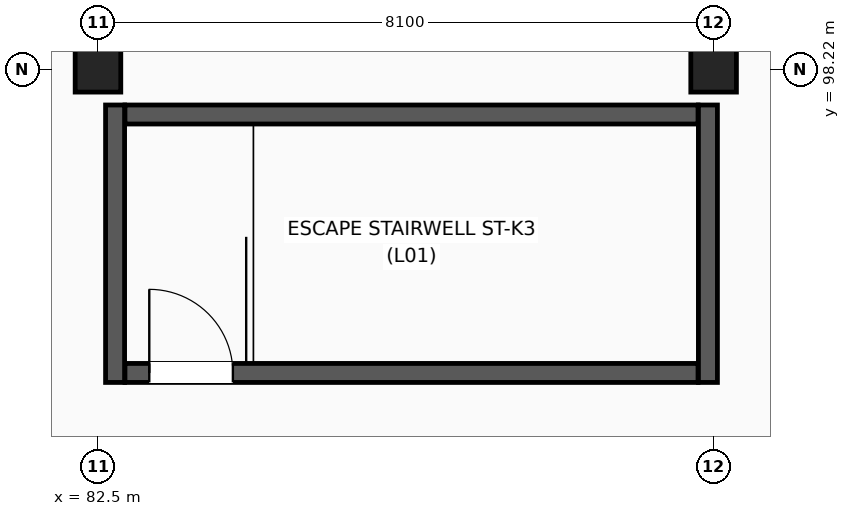
"""IFC4 building model, lengths in metres.
Left out: names, types, materials, properties, quantities, classifications, styles, units other than length and angle.
Written with IfcOpenShell. Run it as: python <this file> out.ifc"""

import sys

from ifc_helpers import new_model, si_unit, direction, frame, frame_2d, origin, origin_2d, place, context, subcontext, project, spatial, rectangle, extrude, element, fill, save


model = new_model("IFC4")
c1 = context("Model", 3, precision=1e-05, world=origin(), true_north=direction((0.0, 1.0)))
c2 = subcontext(c1, "Body", "Model", "MODEL_VIEW")
j1 = project(units=[si_unit("LENGTHUNIT", "METRE"), si_unit("PLANEANGLEUNIT", "RADIAN")], contexts=[c1])
p1 = place(None, origin())
s1 = spatial("IfcSite", under=j1, at=p1, CompositionType="ELEMENT")
p2 = place(p1, origin())
s2 = spatial("IfcBuilding", under=s1, at=p2, CompositionType="ELEMENT")
p3 = place(p2, frame((0.0, 0.0, 5.4)))
s3 = spatial("IfcBuildingStorey", under=s2, at=p3, CompositionType="ELEMENT", Elevation=5.4)
for number, where, z_axis, x_axis in (
    (1, (82.5, 98.22, 0.0), (0.0, 0.0, 1.0), (1.0, 0.0, 0.0)),
    (2, (90.6, 98.22, 0.0), (0.0, 0.0, 1.0), (1.0, 0.0, 0.0)),
):
    element("IfcColumn", number, at=place(p3, frame(where, z_axis=z_axis, x_axis=x_axis)), inside=s3, PredefinedType="COLUMN", context=c2, shape_type="SweptSolid", body=[
        extrude(rectangle(XDim=0.6, YDim=0.6, at=origin_2d()), origin(), (0.0, 0.0, 1.0), 4.8),
    ])
p4 = place(p3, frame((82.855, 94.225, 0.0), z_axis=(0.0, 0.0, 1.0), x_axis=(1.0, 0.0, 0.0)))
e3 = element("IfcWall", 3, at=p4, inside=s3, PredefinedType="SHEAR", context=c2, shape_type="SweptSolid", body=[
    extrude(rectangle(XDim=7.54, YDim=0.25, at=frame_2d((3.77, 0.0))), origin(), (0.0, 0.0, 1.0), 4.525),
])
p5 = place(p4, frame((0.32, 0.0, 0.0)))
e4 = element("IfcOpeningElement", 4, at=p5, cuts=e3, PredefinedType="OPENING", context=c2, shape_type="SweptSolid", body=[
    extrude(rectangle(XDim=1.1, YDim=2.2, at=frame_2d((0.55, 1.1))), frame((0.0, 0.135, 0.0), z_axis=(0.0, -1.0, 0.0), x_axis=(1.0, 0.0, 0.0)), (0.0, 0.0, 1.0), 0.27),
])
p6 = place(p3, frame((82.855, 97.625, 0.0), z_axis=(0.0, 0.0, 1.0), x_axis=(1.0, 0.0, 0.0)))
e5 = element("IfcWall", 5, at=p6, inside=s3, PredefinedType="SHEAR", context=c2, shape_type="SweptSolid", body=[
    extrude(rectangle(XDim=7.54, YDim=0.25, at=frame_2d((3.77, 0.0))), origin(), (0.0, 0.0, 1.0), 4.525),
])
for number, where, z_axis, x_axis in (
    (6, (82.725, 94.1, 0.0), (0.0, 0.0, 1.0), (0.0, 1.0, 0.0)),
    (7, (90.525, 94.1, 0.0), (0.0, 0.0, 1.0), (0.0, 1.0, 0.0)),
):
    element("IfcWall", number, at=place(p3, frame(where, z_axis=z_axis, x_axis=x_axis)), inside=s3, PredefinedType="SHEAR", context=c2, shape_type="SweptSolid", body=[
        extrude(rectangle(XDim=3.65, YDim=0.25, at=frame_2d((1.825, 0.0))), origin(), (0.0, 0.0, 1.0), 4.525),
    ])
p7 = place(p5, origin())
e8 = element("IfcDoor", 8, at=p7, inside=s3, OperationType="SINGLE_SWING_LEFT", PredefinedType="DOOR", context=c2, shape_type="SweptSolid", body=[
    extrude(rectangle(XDim=1.1, YDim=2.2, at=frame_2d((0.55, 1.1))), frame((0.0, 0.025, 0.0), z_axis=(0.0, -1.0, 0.0), x_axis=(1.0, 0.0, 0.0)), (0.0, 0.0, 1.0), 0.05),
])
fill(e4, e8)
save(model, sys.argv[1])
